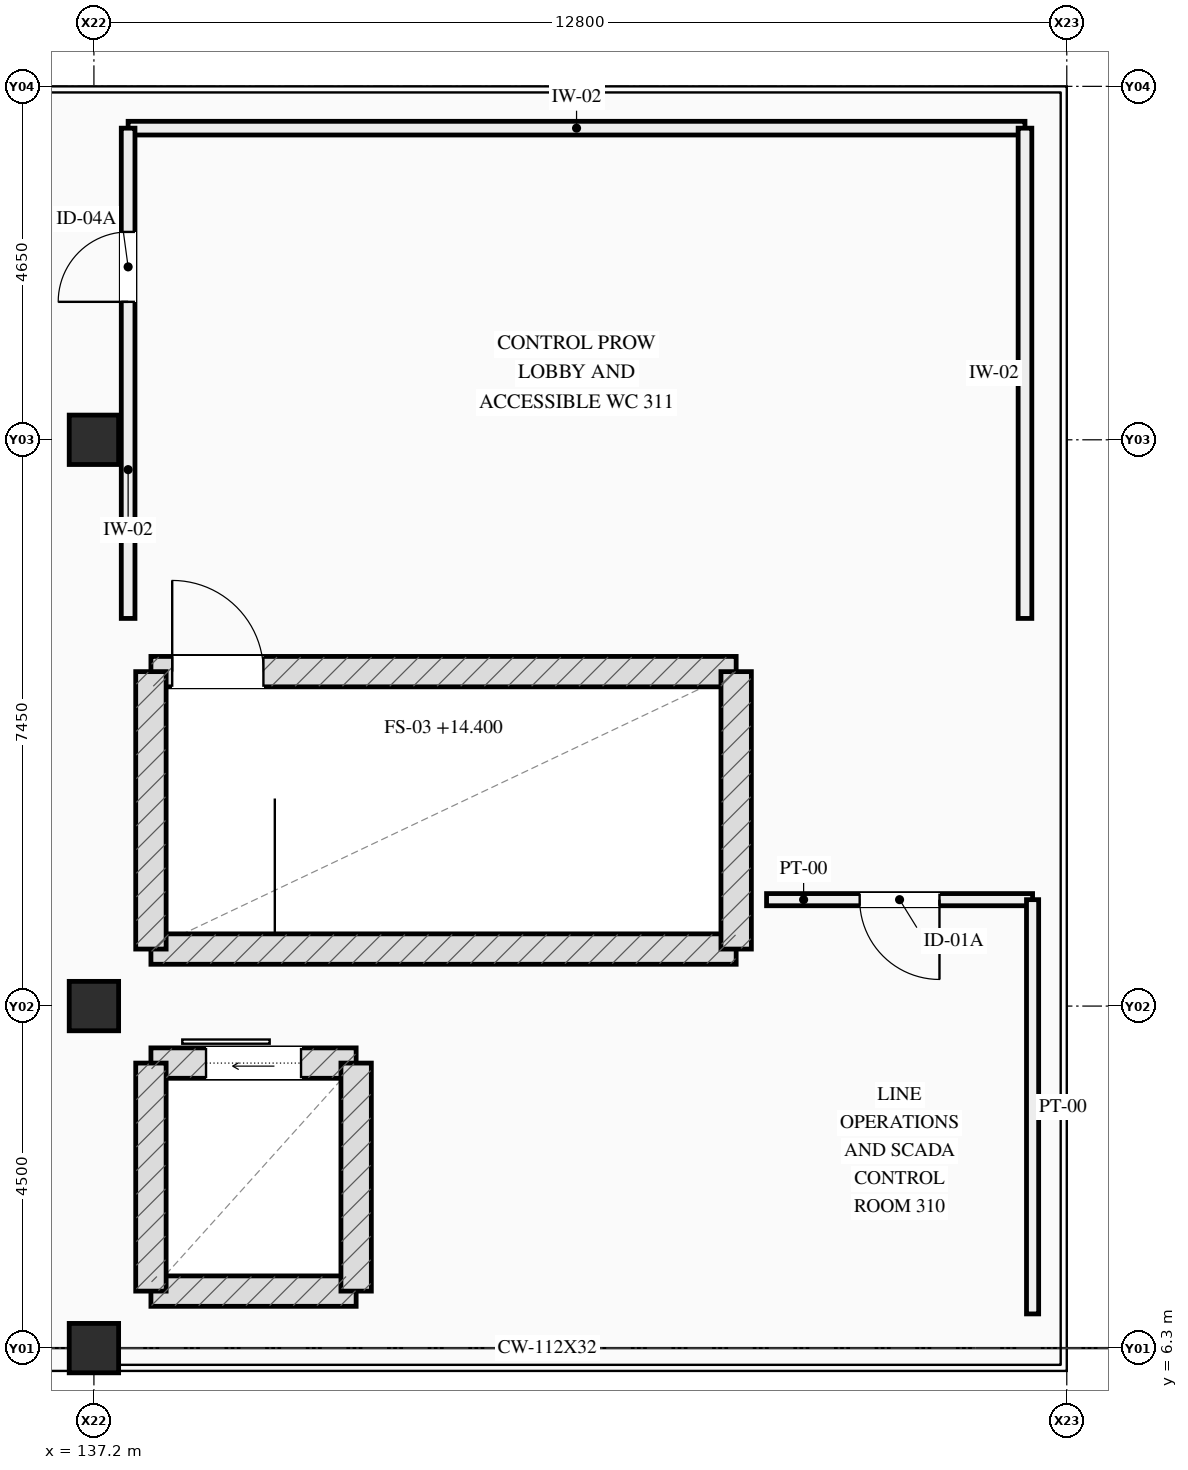
"""IFC4 building model, lengths in metres.
Left out: names, types, materials, properties, quantities, classifications, styles, units other than length and angle.
Written with IfcOpenShell. Run it as: python <this file> out.ifc"""

import sys

from ifc_helpers import new_model, si_unit, direction, frame, frame_2d, origin, origin_2d, place, context, subcontext, project, spatial, rectangle, extrude, element, fill, save


model = new_model("IFC4")
c1 = context("Model", 3, precision=1e-05, world=origin(), true_north=direction((0.0, 1.0)))
c2 = subcontext(c1, "Body", "Model", "MODEL_VIEW")
j1 = project(units=[si_unit("LENGTHUNIT", "METRE"), si_unit("PLANEANGLEUNIT", "RADIAN")], contexts=[c1])
p1 = place(None, origin())
s1 = spatial("IfcSite", under=j1, at=p1, CompositionType="ELEMENT")
p2 = place(p1, origin())
s2 = spatial("IfcBuilding", under=s1, at=p2, CompositionType="ELEMENT")
p3 = place(p2, frame((0.0, 0.0, 14.4)))
s3 = spatial("IfcBuildingStorey", under=s2, at=p3, CompositionType="ELEMENT", Elevation=14.4)
for number, where, z_axis, x_axis in (
    (1, (137.2, 6.3, 0.0), (0.0, 0.0, 1.0), (1.0, 0.0, 0.0)),
    (2, (137.2, 10.8, 0.0), (0.0, 0.0, 1.0), (1.0, 0.0, 0.0)),
    (3, (137.2, 18.25, 0.0), (0.0, 0.0, 1.0), (1.0, 0.0, 0.0)),
):
    element("IfcColumn", number, at=place(p3, frame(where, z_axis=z_axis, x_axis=x_axis)), inside=s3, PredefinedType="COLUMN", context=c2, shape_type="SweptSolid", body=[
        extrude(rectangle(XDim=0.65, YDim=0.65, at=origin_2d()), origin(), (0.0, 0.0, 1.0), 4.2),
    ])
p4 = place(p3, frame((137.95, 11.55, 0.0), z_axis=(0.0, 0.0, 1.0), x_axis=(1.0, 0.0, 0.0)))
e4 = element("IfcWall", 4, at=p4, inside=s3, PredefinedType="SHEAR", context=c2, shape_type="SweptSolid", body=[
    extrude(rectangle(XDim=7.7, YDim=0.4, at=frame_2d((3.85, 0.0))), origin(), (0.0, 0.0, 1.0), 3.99),
])
p5 = place(p3, frame((145.65, 15.2, 0.0), z_axis=(0.0, 0.0, 1.0), x_axis=(-1.0, 0.0, 0.0)))
e5 = element("IfcWall", 5, at=p5, inside=s3, PredefinedType="SHEAR", context=c2, shape_type="SweptSolid", body=[
    extrude(rectangle(XDim=7.7, YDim=0.4, at=frame_2d((3.85, 0.0))), origin(), (0.0, 0.0, 1.0), 3.99),
])
p6 = place(p5, frame((6.22, 0.0, 0.0)))
e6 = element("IfcOpeningElement", 6, at=p6, cuts=e5, PredefinedType="OPENING", context=c2, shape_type="SweptSolid", body=[
    extrude(rectangle(XDim=1.2, YDim=2.2, at=frame_2d((0.6, 1.1))), frame((0.0, 0.21, 0.0), z_axis=(0.0, -1.0, 0.0), x_axis=(1.0, 0.0, 0.0)), (0.0, 0.0, 1.0), 0.42),
])
for number, where, z_axis, x_axis in (
    (7, (137.95, 15.2, 0.0), (0.0, 0.0, 1.0), (0.0, -1.0, 0.0)),
    (8, (145.65, 11.55, 0.0), (0.0, 0.0, 1.0), (0.0, 1.0, 0.0)),
):
    element("IfcWall", number, at=place(p3, frame(where, z_axis=z_axis, x_axis=x_axis)), inside=s3, PredefinedType="SHEAR", context=c2, shape_type="SweptSolid", body=[
        extrude(rectangle(XDim=3.65, YDim=0.4, at=frame_2d((1.825, 0.0))), origin(), (0.0, 0.0, 1.0), 3.99),
    ])
p7 = place(p3, frame((137.95, 7.05, 0.0), z_axis=(0.0, 0.0, 1.0), x_axis=(1.0, 0.0, 0.0)))
e9 = element("IfcWall", 9, at=p7, inside=s3, PredefinedType="SHEAR", context=c2, shape_type="SweptSolid", body=[
    extrude(rectangle(XDim=2.7, YDim=0.4, at=frame_2d((1.35, 0.0))), origin(), (0.0, 0.0, 1.0), 4.005),
])
p8 = place(p3, frame((137.95, 10.05, 0.0), z_axis=(0.0, 0.0, 1.0), x_axis=(1.0, 0.0, 0.0)))
e10 = element("IfcWall", 10, at=p8, inside=s3, PredefinedType="SHEAR", context=c2, shape_type="SweptSolid", body=[
    extrude(rectangle(XDim=2.7, YDim=0.4, at=frame_2d((1.35, 0.0))), origin(), (0.0, 0.0, 1.0), 4.005),
])
p9 = place(p8, frame((0.725, 0.0, 0.0)))
e11 = element("IfcOpeningElement", 11, at=p9, cuts=e10, PredefinedType="OPENING", context=c2, shape_type="SweptSolid", body=[
    extrude(rectangle(XDim=1.25, YDim=2.2, at=frame_2d((0.625, 1.1))), frame((0.0, 0.21, 0.0), z_axis=(0.0, -1.0, 0.0), x_axis=(1.0, 0.0, 0.0)), (0.0, 0.0, 1.0), 0.42),
])
for number, where, z_axis, x_axis in (
    (12, (137.95, 7.05, 0.0), (0.0, 0.0, 1.0), (0.0, 1.0, 0.0)),
    (13, (140.65, 7.05, 0.0), (0.0, 0.0, 1.0), (0.0, 1.0, 0.0)),
):
    element("IfcWall", number, at=place(p3, frame(where, z_axis=z_axis, x_axis=x_axis)), inside=s3, PredefinedType="SHEAR", context=c2, shape_type="SweptSolid", body=[
        extrude(rectangle(XDim=3.0, YDim=0.4, at=frame_2d((1.5, 0.0))), origin(), (0.0, 0.0, 1.0), 4.005),
    ])
p10 = place(p3, frame((146.05, 12.2, 0.0), z_axis=(0.0, 0.0, 1.0), x_axis=(1.0, 0.0, 0.0)))
e14 = element("IfcWall", 14, at=p10, inside=s3, PredefinedType="PARTITIONING", context=c2, shape_type="SweptSolid", body=[
    extrude(rectangle(XDim=3.5, YDim=0.16, at=frame_2d((1.75, 0.0))), origin(), (0.0, 0.0, 1.0), 3.05),
])
p11 = place(p10, frame((1.225, 0.0, 0.0)))
e15 = element("IfcOpeningElement", 15, at=p11, cuts=e14, PredefinedType="OPENING", context=c2, shape_type="SweptSolid", body=[
    extrude(rectangle(XDim=1.05, YDim=2.2, at=frame_2d((0.525, 1.1))), frame((0.0, 0.09, 0.0), z_axis=(0.0, -1.0, 0.0), x_axis=(1.0, 0.0, 0.0)), (0.0, 0.0, 1.0), 0.18),
])
p12 = place(p3, frame((149.55, 6.75, 0.0), z_axis=(0.0, 0.0, 1.0), x_axis=(0.0, 1.0, 0.0)))
e16 = element("IfcWall", 16, at=p12, inside=s3, PredefinedType="PARTITIONING", context=c2, shape_type="SweptSolid", body=[
    extrude(rectangle(XDim=5.45, YDim=0.16, at=frame_2d((2.725, 0.0))), origin(), (0.0, 0.0, 1.0), 3.05),
])
p13 = place(p3, frame((137.65, 22.35, 0.0), z_axis=(0.0, 0.0, 1.0), x_axis=(1.0, 0.0, 0.0)))
e17 = element("IfcWall", 17, at=p13, inside=s3, PredefinedType="PLUMBINGWALL", context=c2, shape_type="SweptSolid", body=[
    extrude(rectangle(XDim=11.8, YDim=0.18, at=frame_2d((5.9, 0.0))), origin(), (0.0, 0.0, 1.0), 3.05),
])
p14 = place(p3, frame((137.65, 15.9, 0.0), z_axis=(0.0, 0.0, 1.0), x_axis=(0.0, 1.0, 0.0)))
e18 = element("IfcWall", 18, at=p14, inside=s3, PredefinedType="PLUMBINGWALL", context=c2, shape_type="SweptSolid", body=[
    extrude(rectangle(XDim=6.45, YDim=0.18, at=frame_2d((3.225, 0.0))), origin(), (0.0, 0.0, 1.0), 3.05),
])
p15 = place(p14, frame((4.165, 0.0, 0.0)))
e19 = element("IfcOpeningElement", 19, at=p15, cuts=e18, PredefinedType="OPENING", context=c2, shape_type="SweptSolid", body=[
    extrude(rectangle(XDim=0.92, YDim=2.1, at=frame_2d((0.46, 1.05))), frame((0.0, 0.1, 0.0), z_axis=(0.0, -1.0, 0.0), x_axis=(1.0, 0.0, 0.0)), (0.0, 0.0, 1.0), 0.2),
])
p16 = place(p3, frame((149.45, 15.9, 0.0), z_axis=(0.0, 0.0, 1.0), x_axis=(0.0, 1.0, 0.0)))
e20 = element("IfcWall", 20, at=p16, inside=s3, PredefinedType="PLUMBINGWALL", context=c2, shape_type="SweptSolid", body=[
    extrude(rectangle(XDim=6.45, YDim=0.18, at=frame_2d((3.225, 0.0))), origin(), (0.0, 0.0, 1.0), 3.05),
])
p17 = place(p6, origin())
e21 = element("IfcDoor", 21, at=p17, inside=s3, OperationType="SINGLE_SWING_RIGHT", PredefinedType="DOOR", context=c2, shape_type="SweptSolid", body=[
    extrude(rectangle(XDim=1.2, YDim=2.2, at=frame_2d((0.6, 1.1))), frame((0.0, 0.025, 0.0), z_axis=(0.0, -1.0, 0.0), x_axis=(1.0, 0.0, 0.0)), (0.0, 0.0, 1.0), 0.05),
])
fill(e6, e21)
p18 = place(p9, origin())
e22 = element("IfcDoor", 22, at=p18, inside=s3, OperationType="SLIDING_TO_LEFT", PredefinedType="DOOR", context=c2, shape_type="SweptSolid", body=[
    extrude(rectangle(XDim=1.25, YDim=2.2, at=frame_2d((0.625, 1.1))), frame((0.0, 0.025, 0.0), z_axis=(0.0, -1.0, 0.0), x_axis=(1.0, 0.0, 0.0)), (0.0, 0.0, 1.0), 0.05),
])
fill(e11, e22)
p19 = place(p11, origin())
e23 = element("IfcDoor", 23, at=p19, inside=s3, OperationType="SINGLE_SWING_RIGHT", PredefinedType="DOOR", context=c2, shape_type="SweptSolid", body=[
    extrude(rectangle(XDim=1.05, YDim=2.2, at=frame_2d((0.525, 1.1))), frame((0.0, 0.025, 0.0), z_axis=(0.0, -1.0, 0.0), x_axis=(1.0, 0.0, 0.0)), (0.0, 0.0, 1.0), 0.05),
])
fill(e15, e23)
p20 = place(p15, origin())
e24 = element("IfcDoor", 24, at=p20, inside=s3, OperationType="SINGLE_SWING_LEFT", PredefinedType="DOOR", context=c2, shape_type="SweptSolid", body=[
    extrude(rectangle(XDim=0.92, YDim=2.1, at=frame_2d((0.46, 1.05))), frame((0.0, 0.025, 0.0), z_axis=(0.0, -1.0, 0.0), x_axis=(1.0, 0.0, 0.0)), (0.0, 0.0, 1.0), 0.05),
])
fill(e19, e24)
save(model, sys.argv[1])
